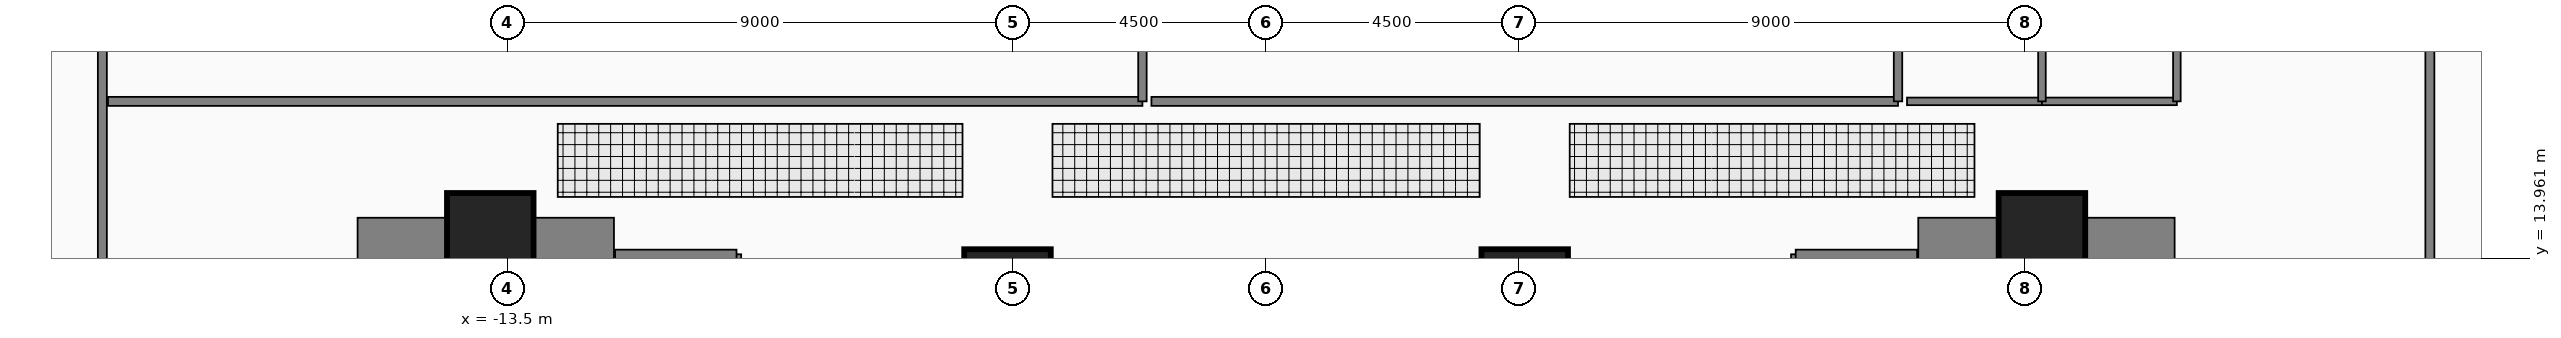
"""IFC4 building model, lengths in metres.
Left out: names, types, materials, properties, quantities, classifications, styles, units other than length and angle.
Written with IfcOpenShell. Run it as: python <this file> out.ifc"""

import sys

from ifc_helpers import new_model, si_unit, direction, frame, frame_2d, origin, origin_2d, place, context, subcontext, project, spatial, rectangle, extrude, element, fill, save


model = new_model("IFC4")
c1 = context("Model", 3, precision=1e-05, world=origin(), true_north=direction((0.0, 1.0)))
c2 = subcontext(c1, "Body", "Model", "MODEL_VIEW")
j1 = project(units=[si_unit("LENGTHUNIT", "METRE"), si_unit("PLANEANGLEUNIT", "RADIAN")], contexts=[c1])
p1 = place(None, origin())
s1 = spatial("IfcSite", under=j1, at=p1, CompositionType="ELEMENT")
p2 = place(p1, origin())
s2 = spatial("IfcBuilding", under=s1, at=p2, CompositionType="ELEMENT")
p3 = place(p2, frame((0.0, 0.0, 154.05)))
s3 = spatial("IfcBuildingStorey", under=s2, at=p3, CompositionType="ELEMENT", Elevation=154.05)
for number, where, z_axis, x_axis in (
    (1, (-16.16, 14.305, 0.0), (0.0, 0.0, 1.0), (1.0, 0.0, 0.0)),
    (2, (11.6, 14.305, 0.0), (0.0, 0.0, 1.0), (1.0, 0.0, 0.0)),
):
    element("IfcWall", number, at=place(p3, frame(where, z_axis=z_axis, x_axis=x_axis)), inside=s3, PredefinedType="SHEAR", context=c2, shape_type="SweptSolid", body=[
        extrude(rectangle(XDim=4.56, YDim=0.75, at=frame_2d((2.28, 0.0))), origin(), (0.0, 0.0, 1.0), 4.31),
    ])
for number, where, z_axis, x_axis in (
    (3, (-13.8, 14.35, 0.0), (0.0, 0.0, 1.0), (1.0, 0.0, 0.0)),
    (4, (-4.6, 13.35, 0.0), (0.0, 0.0, 1.0), (1.0, 0.0, 0.0)),
    (5, (4.6, 13.35, 0.0), (0.0, 0.0, 1.0), (1.0, 0.0, 0.0)),
    (6, (13.8, 14.35, 0.0), (0.0, 0.0, 1.0), (1.0, 0.0, 0.0)),
):
    element("IfcColumn", number, at=place(p3, frame(where, z_axis=z_axis, x_axis=x_axis)), inside=s3, PredefinedType="COLUMN", context=c2, shape_type="SweptSolid", body=[
        extrude(rectangle(XDim=1.5, YDim=1.5, at=origin_2d()), origin(), (0.0, 0.0, 1.0), 4.5),
    ])
p4 = place(p3, frame((-20.6, 16.75, 0.0), z_axis=(0.0, 0.0, 1.0), x_axis=(1.0, 0.0, 0.0)))
e7 = element("IfcWall", 7, at=p4, inside=s3, PredefinedType="PARTITIONING", context=c2, shape_type="SweptSolid", body=[
    extrude(rectangle(XDim=18.4, YDim=0.16, at=frame_2d((9.2, 0.0))), origin(), (0.0, 0.0, 1.0), 3.823),
])
p5 = place(p4, frame((8.66, 0.0, 0.0)))
e8 = element("IfcOpeningElement", 8, at=p5, cuts=e7, PredefinedType="OPENING", context=c2, shape_type="SweptSolid", body=[
    extrude(rectangle(XDim=1.08, YDim=2.18, at=frame_2d((0.54, 1.09))), frame((0.0, 0.09, 0.0), z_axis=(0.0, -1.0, 0.0), x_axis=(1.0, 0.0, 0.0)), (0.0, 0.0, 1.0), 0.18),
])
p6 = place(p3, frame((-2.04, 16.75, 0.0), z_axis=(0.0, 0.0, 1.0), x_axis=(1.0, 0.0, 0.0)))
e9 = element("IfcWall", 9, at=p6, inside=s3, PredefinedType="PARTITIONING", context=c2, shape_type="SweptSolid", body=[
    extrude(rectangle(XDim=13.28, YDim=0.16, at=frame_2d((6.64, 0.0))), origin(), (0.0, 0.0, 1.0), 3.823),
])
p7 = place(p6, frame((8.45, 0.0, 0.0)))
e10 = element("IfcOpeningElement", 10, at=p7, cuts=e9, PredefinedType="OPENING", context=c2, shape_type="SweptSolid", body=[
    extrude(rectangle(XDim=1.08, YDim=2.18, at=frame_2d((0.54, 1.09))), frame((0.0, 0.09, 0.0), z_axis=(0.0, -1.0, 0.0), x_axis=(1.0, 0.0, 0.0)), (0.0, 0.0, 1.0), 0.18),
])
p8 = place(p3, frame((20.7, -6.2, 0.0), z_axis=(0.0, 0.0, 1.0), x_axis=(0.0, 1.0, 0.0)))
e11 = element("IfcWall", 11, at=p8, inside=s3, PredefinedType="PARTITIONING", context=c2, shape_type="SweptSolid", body=[
    extrude(rectangle(XDim=27.4, YDim=0.16, at=frame_2d((13.7, 0.0))), origin(), (0.0, 0.0, 1.0), 4.28),
])
p9 = place(p8, frame((13.16, 0.0, 0.0)))
e12 = element("IfcOpeningElement", 12, at=p9, cuts=e11, PredefinedType="OPENING", context=c2, shape_type="SweptSolid", body=[
    extrude(rectangle(XDim=1.08, YDim=2.18, at=frame_2d((0.54, 1.09))), frame((0.0, 0.09, 0.0), z_axis=(0.0, -1.0, 0.0), x_axis=(1.0, 0.0, 0.0)), (0.0, 0.0, 1.0), 0.18),
])
p10 = place(p3, frame((-20.7, -6.2, 0.0), z_axis=(0.0, 0.0, 1.0), x_axis=(0.0, 1.0, 0.0)))
e13 = element("IfcWall", 13, at=p10, inside=s3, PredefinedType="PARTITIONING", context=c2, shape_type="SweptSolid", body=[
    extrude(rectangle(XDim=27.4, YDim=0.16, at=frame_2d((13.7, 0.0))), origin(), (0.0, 0.0, 1.0), 4.28),
])
p11 = place(p10, frame((13.16, 0.0, 0.0)))
e14 = element("IfcOpeningElement", 14, at=p11, cuts=e13, PredefinedType="OPENING", context=c2, shape_type="SweptSolid", body=[
    extrude(rectangle(XDim=1.08, YDim=2.18, at=frame_2d((0.54, 1.09))), frame((0.0, 0.09, 0.0), z_axis=(0.0, -1.0, 0.0), x_axis=(1.0, 0.0, 0.0)), (0.0, 0.0, 1.0), 0.18),
])
p12 = place(p3, frame((11.4, 16.75, 0.0), z_axis=(0.0, 0.0, 1.0), x_axis=(1.0, 0.0, 0.0)))
e15 = element("IfcWall", 15, at=p12, inside=s3, PredefinedType="PLUMBINGWALL", context=c2, shape_type="SweptSolid", body=[
    extrude(rectangle(XDim=2.4, YDim=0.135, at=frame_2d((1.2, 0.0))), origin(), (0.0, 0.0, 1.0), 3.823),
])
p13 = place(p12, frame((0.74, 0.0, 0.0)))
e16 = element("IfcOpeningElement", 16, at=p13, cuts=e15, PredefinedType="OPENING", context=c2, shape_type="SweptSolid", body=[
    extrude(rectangle(XDim=0.92, YDim=2.12, at=frame_2d((0.46, 1.06))), frame((0.0, 0.077, 0.0), z_axis=(0.0, -1.0, 0.0), x_axis=(1.0, 0.0, 0.0)), (0.0, 0.0, 1.0), 0.155),
])
p14 = place(p3, frame((13.8, 16.75, 0.0), z_axis=(0.0, 0.0, 1.0), x_axis=(1.0, 0.0, 0.0)))
e17 = element("IfcWall", 17, at=p14, inside=s3, PredefinedType="PLUMBINGWALL", context=c2, shape_type="SweptSolid", body=[
    extrude(rectangle(XDim=2.4, YDim=0.135, at=frame_2d((1.2, 0.0))), origin(), (0.0, 0.0, 1.0), 4.28),
])
p15 = place(p14, frame((0.74, 0.0, 0.0)))
e18 = element("IfcOpeningElement", 18, at=p15, cuts=e17, PredefinedType="OPENING", context=c2, shape_type="SweptSolid", body=[
    extrude(rectangle(XDim=0.92, YDim=2.12, at=frame_2d((0.46, 1.06))), frame((0.0, 0.077, 0.0), z_axis=(0.0, -1.0, 0.0), x_axis=(1.0, 0.0, 0.0)), (0.0, 0.0, 1.0), 0.155),
])
p16 = place(p3, frame((-9.42, 11.07, 0.0), z_axis=(0.0, 0.0, 1.0), x_axis=(0.0, 1.0, 0.0)))
e19 = element("IfcWall", 19, at=p16, inside=s3, PredefinedType="PARTITIONING", context=c2, shape_type="SweptSolid", body=[
    extrude(rectangle(XDim=2.96, YDim=0.165, at=frame_2d((1.48, 0.0))), origin(), (0.0, 0.0, 1.0), 4.28),
])
p17 = place(p3, frame((-11.58, 14.03, 0.0), z_axis=(0.0, 0.0, 1.0), x_axis=(1.0, 0.0, 0.0)))
e20 = element("IfcWall", 20, at=p17, inside=s3, PredefinedType="PARTITIONING", context=c2, shape_type="SweptSolid", body=[
    extrude(rectangle(XDim=2.16, YDim=0.165, at=frame_2d((1.08, 0.0))), origin(), (0.0, 0.0, 1.0), 4.28),
])
p18 = place(p3, frame((9.42, 11.07, 0.0), z_axis=(0.0, 0.0, 1.0), x_axis=(0.0, 1.0, 0.0)))
e21 = element("IfcWall", 21, at=p18, inside=s3, PredefinedType="PARTITIONING", context=c2, shape_type="SweptSolid", body=[
    extrude(rectangle(XDim=2.96, YDim=0.165, at=frame_2d((1.48, 0.0))), origin(), (0.0, 0.0, 1.0), 4.28),
])
p19 = place(p3, frame((9.42, 14.03, 0.0), z_axis=(0.0, 0.0, 1.0), x_axis=(1.0, 0.0, 0.0)))
e22 = element("IfcWall", 22, at=p19, inside=s3, PredefinedType="PARTITIONING", context=c2, shape_type="SweptSolid", body=[
    extrude(rectangle(XDim=2.16, YDim=0.165, at=frame_2d((1.08, 0.0))), origin(), (0.0, 0.0, 1.0), 4.28),
])
p20 = place(p3, frame((-2.2, 16.75, 0.0), z_axis=(0.0, 0.0, 1.0), x_axis=(0.0, 1.0, 0.0)))
e23 = element("IfcWall", 23, at=p20, inside=s3, PredefinedType="PARTITIONING", context=c2, shape_type="SweptSolid", body=[
    extrude(rectangle(XDim=11.59, YDim=0.15, at=frame_2d((5.795, 0.0))), origin(), (0.0, 0.0, 1.0), 4.28),
])
p21 = place(p3, frame((11.24, 16.75, 0.0), z_axis=(0.0, 0.0, 1.0), x_axis=(0.0, 1.0, 0.0)))
e24 = element("IfcWall", 24, at=p21, inside=s3, PredefinedType="PARTITIONING", context=c2, shape_type="SweptSolid", body=[
    extrude(rectangle(XDim=4.56, YDim=0.15, at=frame_2d((2.28, 0.0))), origin(), (0.0, 0.0, 1.0), 4.28),
])
p22 = place(p3, frame((16.2, 16.75, 0.0), z_axis=(0.0, 0.0, 1.0), x_axis=(0.0, 1.0, 0.0)))
e25 = element("IfcWall", 25, at=p22, inside=s3, PredefinedType="PLUMBINGWALL", context=c2, shape_type="SweptSolid", body=[
    extrude(rectangle(XDim=4.4, YDim=0.135, at=frame_2d((2.2, 0.0))), origin(), (0.0, 0.0, 1.0), 4.28),
])
p23 = place(p3, frame((13.8, 16.75, 0.0), z_axis=(0.0, 0.0, 1.0), x_axis=(0.0, 1.0, 0.0)))
e26 = element("IfcWall", 26, at=p23, inside=s3, PredefinedType="PLUMBINGWALL", context=c2, shape_type="SweptSolid", body=[
    extrude(rectangle(XDim=4.4, YDim=0.135, at=frame_2d((2.2, 0.0))), origin(), (0.0, 0.0, 1.0), 3.353),
])
p24 = place(p5, origin())
e27 = element("IfcDoor", 27, at=p24, inside=s3, OperationType="SINGLE_SWING_LEFT", PredefinedType="DOOR", context=c2, shape_type="SweptSolid", body=[
    extrude(rectangle(XDim=1.08, YDim=2.18, at=frame_2d((0.54, 1.09))), frame((0.0, 0.025, 0.0), z_axis=(0.0, -1.0, 0.0), x_axis=(1.0, 0.0, 0.0)), (0.0, 0.0, 1.0), 0.05),
])
fill(e8, e27)
p25 = place(p7, origin())
e28 = element("IfcDoor", 28, at=p25, inside=s3, OperationType="SINGLE_SWING_RIGHT", PredefinedType="DOOR", context=c2, shape_type="SweptSolid", body=[
    extrude(rectangle(XDim=1.08, YDim=2.18, at=frame_2d((0.54, 1.09))), frame((0.0, 0.025, 0.0), z_axis=(0.0, -1.0, 0.0), x_axis=(1.0, 0.0, 0.0)), (0.0, 0.0, 1.0), 0.05),
])
fill(e10, e28)
p26 = place(p13, origin())
e29 = element("IfcDoor", 29, at=p26, inside=s3, OperationType="SINGLE_SWING_RIGHT", PredefinedType="DOOR", context=c2, shape_type="SweptSolid", body=[
    extrude(rectangle(XDim=0.92, YDim=2.12, at=frame_2d((0.46, 1.06))), frame((0.0, 0.025, 0.0), z_axis=(0.0, -1.0, 0.0), x_axis=(1.0, 0.0, 0.0)), (0.0, 0.0, 1.0), 0.05),
])
fill(e16, e29)
p27 = place(p15, origin())
e30 = element("IfcDoor", 30, at=p27, inside=s3, OperationType="SINGLE_SWING_LEFT", PredefinedType="DOOR", context=c2, shape_type="SweptSolid", body=[
    extrude(rectangle(XDim=0.92, YDim=2.12, at=frame_2d((0.46, 1.06))), frame((0.0, 0.025, 0.0), z_axis=(0.0, -1.0, 0.0), x_axis=(1.0, 0.0, 0.0)), (0.0, 0.0, 1.0), 0.05),
])
fill(e18, e30)
save(model, sys.argv[1])
